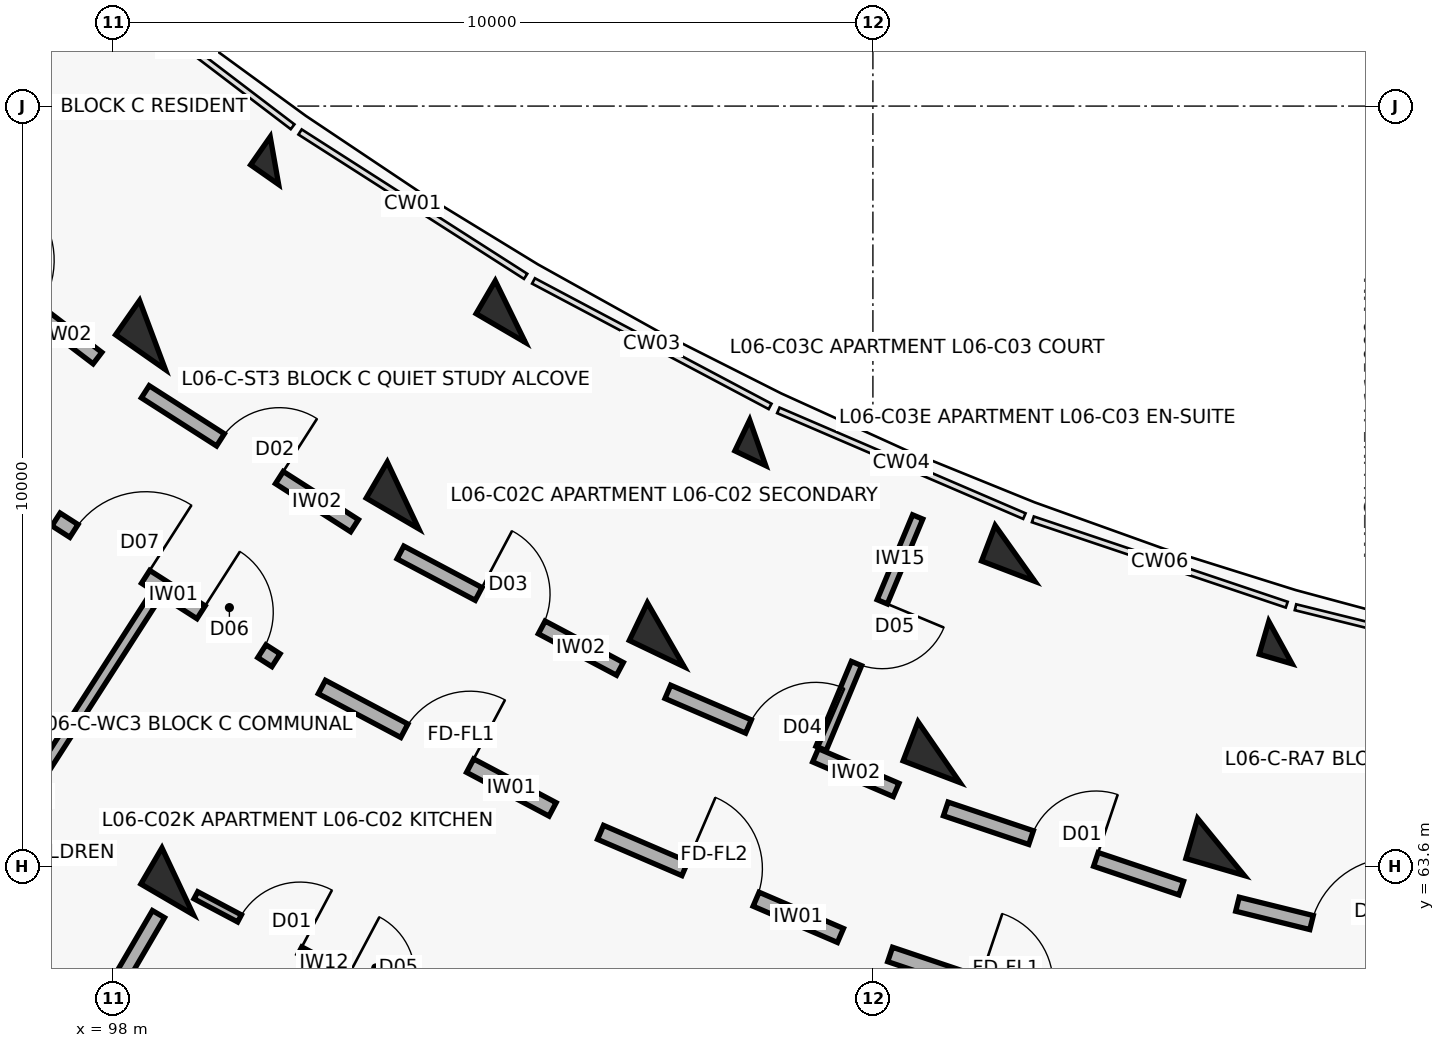
"""IFC4 building model, lengths in metres.
Left out: names, types, materials, properties, quantities, classifications, styles, units other than length and angle.
Written with IfcOpenShell. Run it as: python <this file> out.ifc"""

import sys

from ifc_helpers import new_model, si_unit, direction, frame, frame_2d, origin, origin_2d, place, context, subcontext, project, spatial, rectangle, extrude, element, fill, save


model = new_model("IFC4")
c1 = context("Model", 3, precision=1e-05, world=origin(), true_north=direction((0.0, 1.0)))
c2 = subcontext(c1, "Body", "Model", "MODEL_VIEW")
j1 = project(units=[si_unit("LENGTHUNIT", "METRE"), si_unit("PLANEANGLEUNIT", "RADIAN")], contexts=[c1])
p1 = place(None, origin())
s1 = spatial("IfcSite", under=j1, at=p1, CompositionType="ELEMENT")
p2 = place(p1, origin())
s2 = spatial("IfcBuilding", under=s1, at=p2, CompositionType="ELEMENT")
p3 = place(p2, frame((0.0, 0.0, 20.5)))
s3 = spatial("IfcBuildingStorey", under=s2, at=p3, CompositionType="ELEMENT", Elevation=20.5)
p4 = place(p3, frame((100.126, 72.882, 0.0), z_axis=(0.0, 0.0, 1.0), x_axis=(-0.573004420611, -0.819552276527, 0.0)))
e1 = element("IfcColumn", 1, at=p4, inside=s3, PredefinedType="COLUMN", context=c2, shape_type="SweptSolid", body=[
    extrude(rectangle(XDim=0.45, YDim=0.45, at=origin_2d()), origin(), (0.0, 0.0, 1.0), 3.1),
])
p5 = place(p3, frame((98.522, 70.587, 0.0), z_axis=(0.0, 0.0, 1.0), x_axis=(-0.573004420611, -0.819552276527, 0.0)))
e2 = element("IfcColumn", 2, at=p5, inside=s3, PredefinedType="COLUMN", context=c2, shape_type="SweptSolid", body=[
    extrude(rectangle(XDim=0.55, YDim=0.8, at=origin_2d()), origin(), (0.0, 0.0, 1.0), 3.1),
])
p6 = place(p3, frame((103.229, 70.896, 0.0), z_axis=(0.0, 0.0, 1.0), x_axis=(-0.504226211181, -0.863571611366, 0.0)))
e3 = element("IfcColumn", 3, at=p6, inside=s3, PredefinedType="COLUMN", context=c2, shape_type="SweptSolid", body=[
    extrude(rectangle(XDim=0.5, YDim=0.75, at=origin_2d()), origin(), (0.0, 0.0, 1.0), 3.1),
])
for number, where, z_axis, x_axis in (
    (4, (101.817, 68.478, 0.0), (0.0, 0.0, 1.0), (-0.504, -0.864, 0.0)),
    (5, (98.853, 63.4, 0.0), (0.0, 0.0, 1.0), (-0.504, -0.864, 0.0)),
):
    element("IfcColumn", number, at=place(p3, frame(where, z_axis=z_axis, x_axis=x_axis)), inside=s3, PredefinedType="COLUMN", context=c2, shape_type="SweptSolid", body=[
        extrude(rectangle(XDim=0.55, YDim=0.8, at=origin_2d()), origin(), (0.0, 0.0, 1.0), 3.1),
    ])
p7 = place(p3, frame((106.484, 69.169, 0.0), z_axis=(0.0, 0.0, 1.0), x_axis=(-0.432085748802, -0.901832526405, 0.0)))
e6 = element("IfcColumn", 6, at=p7, inside=s3, PredefinedType="COLUMN", context=c2, shape_type="SweptSolid", body=[
    extrude(rectangle(XDim=0.45, YDim=0.45, at=origin_2d()), origin(), (0.0, 0.0, 1.0), 3.1),
])
p8 = place(p3, frame((105.274, 66.644, 0.0), z_axis=(0.0, 0.0, 1.0), x_axis=(-0.432085748802, -0.901832526405, 0.0)))
e7 = element("IfcColumn", 7, at=p8, inside=s3, PredefinedType="COLUMN", context=c2, shape_type="SweptSolid", body=[
    extrude(rectangle(XDim=0.55, YDim=0.8, at=origin_2d()), origin(), (0.0, 0.0, 1.0), 3.1),
])
p9 = place(p3, frame((109.869, 67.714, 0.0), z_axis=(0.0, 0.0, 1.0), x_axis=(-0.357064076459, -0.934079892355, 0.0)))
e8 = element("IfcColumn", 8, at=p9, inside=s3, PredefinedType="COLUMN", context=c2, shape_type="SweptSolid", body=[
    extrude(rectangle(XDim=0.5, YDim=0.75, at=origin_2d()), origin(), (0.0, 0.0, 1.0), 3.1),
])
p10 = place(p3, frame((108.869, 65.099, 0.0), z_axis=(0.0, 0.0, 1.0), x_axis=(-0.357064076459, -0.934079892355, 0.0)))
e9 = element("IfcColumn", 9, at=p10, inside=s3, PredefinedType="COLUMN", context=c2, shape_type="SweptSolid", body=[
    extrude(rectangle(XDim=0.55, YDim=0.8, at=origin_2d()), origin(), (0.0, 0.0, 1.0), 3.1),
])
p11 = place(p3, frame((113.362, 66.54, 0.0), z_axis=(0.0, 0.0, 1.0), x_axis=(-0.27966144946, -0.96009867914, 0.0)))
e10 = element("IfcColumn", 10, at=p11, inside=s3, PredefinedType="COLUMN", context=c2, shape_type="SweptSolid", body=[
    extrude(rectangle(XDim=0.45, YDim=0.45, at=origin_2d()), origin(), (0.0, 0.0, 1.0), 3.1),
])
p12 = place(p3, frame((112.579, 63.852, 0.0), z_axis=(0.0, 0.0, 1.0), x_axis=(-0.27966144946, -0.96009867914, 0.0)))
e11 = element("IfcColumn", 11, at=p12, inside=s3, PredefinedType="COLUMN", context=c2, shape_type="SweptSolid", body=[
    extrude(rectangle(XDim=0.55, YDim=0.8, at=origin_2d()), origin(), (0.0, 0.0, 1.0), 3.1),
])
p13 = place(p3, frame((95.309, 72.18, 0.0), z_axis=(0.0, 0.0, 1.0), x_axis=(0.795463961918, -0.606000895453, 0.0)))
e12 = element("IfcWall", 12, at=p13, inside=s3, PredefinedType="SOLIDWALL", context=c2, shape_type="SweptSolid", body=[
    extrude(rectangle(XDim=3.129, YDim=0.19, at=frame_2d((1.564, 0.0))), origin(), (0.0, 0.0, 1.0), 2.08),
])
p14 = place(p13, frame((1.004, 0.0, 0.0)))
e13 = element("IfcOpeningElement", 13, at=p14, cuts=e12, PredefinedType="OPENING", context=c2, shape_type="SweptSolid", body=[
    extrude(rectangle(XDim=1.12, YDim=2.15, at=frame_2d((0.56, 1.075))), frame((0.0, 0.105, 0.0), z_axis=(0.0, -1.0, 0.0), x_axis=(1.0, 0.0, 0.0)), (0.0, 0.0, 1.0), 0.21),
])
p15 = place(p3, frame((97.252, 68.161, 0.0), z_axis=(0.0, 0.0, 1.0), x_axis=(0.842289466461, -0.53902546757, 0.0)))
e14 = element("IfcWall", 14, at=p15, inside=s3, PredefinedType="SOLIDWALL", context=c2, shape_type="SweptSolid", body=[
    extrude(rectangle(XDim=3.436, YDim=0.2, at=frame_2d((1.718, 0.0))), origin(), (0.0, 0.0, 1.0), 2.08),
])
p16 = place(p15, frame((0.28, 0.0, 0.0)))
e15 = element("IfcOpeningElement", 15, at=p16, cuts=e14, PredefinedType="OPENING", context=c2, shape_type="SweptSolid", body=[
    extrude(rectangle(XDim=1.12, YDim=2.15, at=frame_2d((0.56, 1.075))), frame((0.0, 0.11, 0.0), z_axis=(0.0, -1.0, 0.0), x_axis=(1.0, 0.0, 0.0)), (0.0, 0.0, 1.0), 0.22),
])
p17 = place(p15, frame((2.266, 0.0, 0.0)))
e16 = element("IfcOpeningElement", 16, at=p17, cuts=e14, PredefinedType="OPENING", context=c2, shape_type="SweptSolid", body=[
    extrude(rectangle(XDim=0.95, YDim=2.1, at=frame_2d((0.475, 1.05))), frame((0.0, 0.11, 0.0), z_axis=(0.0, -1.0, 0.0), x_axis=(1.0, 0.0, 0.0)), (0.0, 0.0, 1.0), 0.22),
])
p18 = place(p3, frame((98.427, 69.841, 0.0), z_axis=(0.0, 0.0, 1.0), x_axis=(0.842280895761, -0.539038860043, 0.0)))
e17 = element("IfcWall", 17, at=p18, inside=s3, PredefinedType="SOLIDWALL", context=c2, shape_type="SweptSolid", body=[
    extrude(rectangle(XDim=3.269, YDim=0.19, at=frame_2d((1.634, 0.0))), origin(), (0.0, 0.0, 1.0), 2.08),
])
p19 = place(p18, frame((1.174, 0.0, 0.0)))
e18 = element("IfcOpeningElement", 18, at=p19, cuts=e17, PredefinedType="OPENING", context=c2, shape_type="SweptSolid", body=[
    extrude(rectangle(XDim=0.92, YDim=2.1, at=frame_2d((0.46, 1.05))), frame((0.0, 0.105, 0.0), z_axis=(0.0, -1.0, 0.0), x_axis=(1.0, 0.0, 0.0)), (0.0, 0.0, 1.0), 0.21),
])
p20 = place(p3, frame((98.504, 67.072, 0.0), z_axis=(0.0, 0.0, 1.0), x_axis=(-0.540338452216, -0.841447774408, 0.0)))
e19 = element("IfcWall", 19, at=p20, inside=s3, PredefinedType="PARTITIONING", context=c2, shape_type="SweptSolid", body=[
    extrude(rectangle(XDim=7.95, YDim=0.14, at=frame_2d((3.975, 0.0))), origin(), (0.0, 0.0, 1.0), 2.08),
])
p21 = place(p20, frame((6.05, 0.0, 0.0)))
e20 = element("IfcOpeningElement", 20, at=p21, cuts=e19, PredefinedType="OPENING", context=c2, shape_type="SweptSolid", body=[
    extrude(rectangle(XDim=0.92, YDim=2.1, at=frame_2d((0.46, 1.05))), frame((0.0, 0.08, 0.0), z_axis=(0.0, -1.0, 0.0), x_axis=(1.0, 0.0, 0.0)), (0.0, 0.0, 1.0), 0.16),
])
p22 = place(p3, frame((100.75, 65.956, 0.0), z_axis=(0.0, 0.0, 1.0), x_axis=(0.883440266101, -0.468543803963, 0.0)))
e21 = element("IfcWall", 21, at=p22, inside=s3, PredefinedType="SOLIDWALL", context=c2, shape_type="SweptSolid", body=[
    extrude(rectangle(XDim=3.436, YDim=0.2, at=frame_2d((1.718, 0.0))), origin(), (0.0, 0.0, 1.0), 2.08),
])
p23 = place(p22, frame((1.228, 0.0, 0.0)))
e22 = element("IfcOpeningElement", 22, at=p23, cuts=e21, PredefinedType="OPENING", context=c2, shape_type="SweptSolid", body=[
    extrude(rectangle(XDim=0.98, YDim=2.15, at=frame_2d((0.49, 1.075))), frame((0.0, 0.11, 0.0), z_axis=(0.0, -1.0, 0.0), x_axis=(1.0, 0.0, 0.0)), (0.0, 0.0, 1.0), 0.22),
])
p24 = place(p3, frame((101.784, 67.726, 0.0), z_axis=(0.0, 0.0, 1.0), x_axis=(0.883444301944, -0.468536194293, 0.0)))
e23 = element("IfcWall", 23, at=p24, inside=s3, PredefinedType="SOLIDWALL", context=c2, shape_type="SweptSolid", body=[
    extrude(rectangle(XDim=3.269, YDim=0.19, at=frame_2d((1.634, 0.0))), origin(), (0.0, 0.0, 1.0), 2.08),
])
p25 = place(p24, frame((1.164, 0.0, 0.0)))
e24 = element("IfcOpeningElement", 24, at=p25, cuts=e23, PredefinedType="OPENING", context=c2, shape_type="SweptSolid", body=[
    extrude(rectangle(XDim=0.94, YDim=2.1, at=frame_2d((0.47, 1.05))), frame((0.0, 0.105, 0.0), z_axis=(0.0, -1.0, 0.0), x_axis=(1.0, 0.0, 0.0)), (0.0, 0.0, 1.0), 0.21),
])
p26 = place(p3, frame((99.093, 63.216, 0.0), z_axis=(0.0, 0.0, 1.0), x_axis=(0.883432667361, -0.468558131121, 0.0)))
e25 = element("IfcWall", 25, at=p26, inside=s3, PredefinedType="PARTITIONING", context=c2, shape_type="SweptSolid", body=[
    extrude(rectangle(XDim=3.797, YDim=0.105, at=frame_2d((1.899, 0.0))), origin(), (0.0, 0.0, 1.0), 2.08),
])
p27 = place(p26, frame((0.65, 0.0, 0.0)))
e26 = element("IfcOpeningElement", 26, at=p27, cuts=e25, PredefinedType="OPENING", context=c2, shape_type="SweptSolid", body=[
    extrude(rectangle(XDim=0.9, YDim=2.1, at=frame_2d((0.45, 1.05))), frame((0.0, 0.062, 0.0), z_axis=(0.0, -1.0, 0.0), x_axis=(1.0, 0.0, 0.0)), (0.0, 0.0, 1.0), 0.125),
])
p28 = place(p26, frame((2.267, 0.0, 0.0)))
e27 = element("IfcOpeningElement", 27, at=p28, cuts=e25, PredefinedType="OPENING", context=c2, shape_type="SweptSolid", body=[
    extrude(rectangle(XDim=0.88, YDim=2.1, at=frame_2d((0.44, 1.05))), frame((0.0, 0.062, 0.0), z_axis=(0.0, -1.0, 0.0), x_axis=(1.0, 0.0, 0.0)), (0.0, 0.0, 1.0), 0.125),
])
p29 = place(p3, frame((98.601, 62.968, 0.0), z_axis=(0.0, 0.0, 1.0), x_axis=(-0.504216452091, -0.863577309475, 0.0)))
e28 = element("IfcWall", 28, at=p29, inside=s3, PredefinedType="SOLIDWALL", context=c2, shape_type="SweptSolid", body=[
    extrude(rectangle(XDim=4.35, YDim=0.185, at=frame_2d((2.175, 0.0))), origin(), (0.0, 0.0, 1.0), 2.08),
])
p30 = place(p3, frame((104.417, 64.044, 0.0), z_axis=(0.0, 0.0, 1.0), x_axis=(0.918718172399, -0.394913813008, 0.0)))
e29 = element("IfcWall", 29, at=p30, inside=s3, PredefinedType="SOLIDWALL", context=c2, shape_type="SweptSolid", body=[
    extrude(rectangle(XDim=3.436, YDim=0.2, at=frame_2d((1.718, 0.0))), origin(), (0.0, 0.0, 1.0), 2.08),
])
p31 = place(p30, frame((1.208, 0.0, 0.0)))
e30 = element("IfcOpeningElement", 30, at=p31, cuts=e29, PredefinedType="OPENING", context=c2, shape_type="SweptSolid", body=[
    extrude(rectangle(XDim=1.02, YDim=2.15, at=frame_2d((0.51, 1.075))), frame((0.0, 0.11, 0.0), z_axis=(0.0, -1.0, 0.0), x_axis=(1.0, 0.0, 0.0)), (0.0, 0.0, 1.0), 0.22),
])
p32 = place(p3, frame((105.302, 65.893, 0.0), z_axis=(0.0, 0.0, 1.0), x_axis=(0.918723391052, -0.394901672235, 0.0)))
e31 = element("IfcWall", 31, at=p32, inside=s3, PredefinedType="SOLIDWALL", context=c2, shape_type="SweptSolid", body=[
    extrude(rectangle(XDim=3.269, YDim=0.19, at=frame_2d((1.634, 0.0))), origin(), (0.0, 0.0, 1.0), 2.08),
])
p33 = place(p32, frame((1.154, 0.0, 0.0)))
e32 = element("IfcOpeningElement", 32, at=p33, cuts=e31, PredefinedType="OPENING", context=c2, shape_type="SweptSolid", body=[
    extrude(rectangle(XDim=0.96, YDim=2.1, at=frame_2d((0.48, 1.05))), frame((0.0, 0.105, 0.0), z_axis=(0.0, -1.0, 0.0), x_axis=(1.0, 0.0, 0.0)), (0.0, 0.0, 1.0), 0.21),
])
p34 = place(p3, frame((108.589, 68.194, 0.0), z_axis=(0.0, 0.0, 1.0), x_axis=(-0.385151143297, -0.922853507777, 0.0)))
e33 = element("IfcWall", 33, at=p34, inside=s3, PredefinedType="PARTITIONING", context=c2, shape_type="SweptSolid", body=[
    extrude(rectangle(XDim=3.3, YDim=0.145, at=frame_2d((1.65, 0.0))), origin(), (0.0, 0.0, 1.0), 2.08),
])
p35 = place(p34, frame((1.21, 0.0, 0.0)))
e34 = element("IfcOpeningElement", 34, at=p35, cuts=e33, PredefinedType="OPENING", context=c2, shape_type="SweptSolid", body=[
    extrude(rectangle(XDim=0.88, YDim=2.1, at=frame_2d((0.44, 1.05))), frame((0.0, 0.083, 0.0), z_axis=(0.0, -1.0, 0.0), x_axis=(1.0, 0.0, 0.0)), (0.0, 0.0, 1.0), 0.165),
])
p36 = place(p3, frame((108.227, 62.437, 0.0), z_axis=(0.0, 0.0, 1.0), x_axis=(0.947884468821, -0.318614239745, 0.0)))
e35 = element("IfcWall", 35, at=p36, inside=s3, PredefinedType="SOLIDWALL", context=c2, shape_type="SweptSolid", body=[
    extrude(rectangle(XDim=3.436, YDim=0.2, at=frame_2d((1.718, 0.0))), origin(), (0.0, 0.0, 1.0), 2.08),
])
p37 = place(p36, frame((1.228, 0.0, 0.0)))
e36 = element("IfcOpeningElement", 36, at=p37, cuts=e35, PredefinedType="OPENING", context=c2, shape_type="SweptSolid", body=[
    extrude(rectangle(XDim=0.98, YDim=2.15, at=frame_2d((0.49, 1.075))), frame((0.0, 0.11, 0.0), z_axis=(0.0, -1.0, 0.0), x_axis=(1.0, 0.0, 0.0)), (0.0, 0.0, 1.0), 0.22),
])
p38 = place(p3, frame((108.958, 64.352, 0.0), z_axis=(0.0, 0.0, 1.0), x_axis=(0.94787351033, -0.318646839643, 0.0)))
e37 = element("IfcWall", 37, at=p38, inside=s3, PredefinedType="SOLIDWALL", context=c2, shape_type="SweptSolid", body=[
    extrude(rectangle(XDim=3.269, YDim=0.19, at=frame_2d((1.634, 0.0))), origin(), (0.0, 0.0, 1.0), 2.08),
])
p39 = place(p38, frame((1.184, 0.0, 0.0)))
e38 = element("IfcOpeningElement", 38, at=p39, cuts=e37, PredefinedType="OPENING", context=c2, shape_type="SweptSolid", body=[
    extrude(rectangle(XDim=0.9, YDim=2.1, at=frame_2d((0.45, 1.05))), frame((0.0, 0.105, 0.0), z_axis=(0.0, -1.0, 0.0), x_axis=(1.0, 0.0, 0.0)), (0.0, 0.0, 1.0), 0.21),
])
p40 = place(p3, frame((112.796, 63.098, 0.0), z_axis=(0.0, 0.0, 1.0), x_axis=(0.970708998014, -0.240258280136, 0.0)))
e39 = element("IfcWall", 39, at=p40, inside=s3, PredefinedType="SOLIDWALL", context=c2, shape_type="SweptSolid", body=[
    extrude(rectangle(XDim=3.129, YDim=0.19, at=frame_2d((1.564, 0.0))), origin(), (0.0, 0.0, 1.0), 2.08),
])
p41 = place(p40, frame((1.004, 0.0, 0.0)))
e40 = element("IfcOpeningElement", 40, at=p41, cuts=e39, PredefinedType="OPENING", context=c2, shape_type="SweptSolid", body=[
    extrude(rectangle(XDim=1.12, YDim=2.15, at=frame_2d((0.56, 1.075))), frame((0.0, 0.105, 0.0), z_axis=(0.0, -1.0, 0.0), x_axis=(1.0, 0.0, 0.0)), (0.0, 0.0, 1.0), 0.21),
])
p42 = place(p16, origin())
e41 = element("IfcDoor", 41, at=p42, inside=s3, OperationType="SINGLE_SWING_RIGHT", PredefinedType="DOOR", context=c2, shape_type="SweptSolid", body=[
    extrude(rectangle(XDim=1.12, YDim=2.15, at=frame_2d((0.56, 1.075))), frame((0.0, 0.025, 0.0), z_axis=(0.0, -1.0, 0.0), x_axis=(1.0, 0.0, 0.0)), (0.0, 0.0, 1.0), 0.05),
])
fill(e15, e41)
p43 = place(p17, origin())
e42 = element("IfcDoor", 42, at=p43, inside=s3, OperationType="SINGLE_SWING_LEFT", PredefinedType="DOOR", context=c2, shape_type="SweptSolid", body=[
    extrude(rectangle(XDim=0.95, YDim=2.1, at=frame_2d((0.475, 1.05))), frame((0.0, 0.025, 0.0), z_axis=(0.0, -1.0, 0.0), x_axis=(1.0, 0.0, 0.0)), (0.0, 0.0, 1.0), 0.05),
])
fill(e16, e42)
p44 = place(p19, origin())
e43 = element("IfcDoor", 43, at=p44, inside=s3, OperationType="SINGLE_SWING_RIGHT", PredefinedType="DOOR", context=c2, shape_type="SweptSolid", body=[
    extrude(rectangle(XDim=0.92, YDim=2.1, at=frame_2d((0.46, 1.05))), frame((0.0, 0.025, 0.0), z_axis=(0.0, -1.0, 0.0), x_axis=(1.0, 0.0, 0.0)), (0.0, 0.0, 1.0), 0.05),
])
fill(e18, e43)
p45 = place(p23, origin())
e44 = element("IfcDoor", 44, at=p45, inside=s3, OperationType="SINGLE_SWING_RIGHT", PredefinedType="DOOR", context=c2, shape_type="SweptSolid", body=[
    extrude(rectangle(XDim=0.98, YDim=2.15, at=frame_2d((0.49, 1.075))), frame((0.0, 0.025, 0.0), z_axis=(0.0, -1.0, 0.0), x_axis=(1.0, 0.0, 0.0)), (0.0, 0.0, 1.0), 0.05),
])
fill(e22, e44)
p46 = place(p25, origin())
e45 = element("IfcDoor", 45, at=p46, inside=s3, OperationType="SINGLE_SWING_LEFT", PredefinedType="DOOR", context=c2, shape_type="SweptSolid", body=[
    extrude(rectangle(XDim=0.94, YDim=2.1, at=frame_2d((0.47, 1.05))), frame((0.0, 0.025, 0.0), z_axis=(0.0, -1.0, 0.0), x_axis=(1.0, 0.0, 0.0)), (0.0, 0.0, 1.0), 0.05),
])
fill(e24, e45)
p47 = place(p27, origin())
e46 = element("IfcDoor", 46, at=p47, inside=s3, OperationType="SINGLE_SWING_RIGHT", PredefinedType="DOOR", context=c2, shape_type="SweptSolid", body=[
    extrude(rectangle(XDim=0.9, YDim=2.1, at=frame_2d((0.45, 1.05))), frame((0.0, 0.025, 0.0), z_axis=(0.0, -1.0, 0.0), x_axis=(1.0, 0.0, 0.0)), (0.0, 0.0, 1.0), 0.05),
])
fill(e26, e46)
p48 = place(p31, origin())
e47 = element("IfcDoor", 47, at=p48, inside=s3, OperationType="SINGLE_SWING_LEFT", PredefinedType="DOOR", context=c2, shape_type="SweptSolid", body=[
    extrude(rectangle(XDim=1.02, YDim=2.15, at=frame_2d((0.51, 1.075))), frame((0.0, 0.025, 0.0), z_axis=(0.0, -1.0, 0.0), x_axis=(1.0, 0.0, 0.0)), (0.0, 0.0, 1.0), 0.05),
])
fill(e30, e47)
p49 = place(p33, origin())
e48 = element("IfcDoor", 48, at=p49, inside=s3, OperationType="SINGLE_SWING_RIGHT", PredefinedType="DOOR", context=c2, shape_type="SweptSolid", body=[
    extrude(rectangle(XDim=0.96, YDim=2.1, at=frame_2d((0.48, 1.05))), frame((0.0, 0.025, 0.0), z_axis=(0.0, -1.0, 0.0), x_axis=(1.0, 0.0, 0.0)), (0.0, 0.0, 1.0), 0.05),
])
fill(e32, e48)
p50 = place(p35, origin())
e49 = element("IfcDoor", 49, at=p50, inside=s3, OperationType="SINGLE_SWING_LEFT", PredefinedType="DOOR", context=c2, shape_type="SweptSolid", body=[
    extrude(rectangle(XDim=0.88, YDim=2.1, at=frame_2d((0.44, 1.05))), frame((0.0, 0.025, 0.0), z_axis=(0.0, -1.0, 0.0), x_axis=(1.0, 0.0, 0.0)), (0.0, 0.0, 1.0), 0.05),
])
fill(e34, e49)
p51 = place(p39, origin())
e50 = element("IfcDoor", 50, at=p51, inside=s3, OperationType="SINGLE_SWING_RIGHT", PredefinedType="DOOR", context=c2, shape_type="SweptSolid", body=[
    extrude(rectangle(XDim=0.9, YDim=2.1, at=frame_2d((0.45, 1.05))), frame((0.0, 0.025, 0.0), z_axis=(0.0, -1.0, 0.0), x_axis=(1.0, 0.0, 0.0)), (0.0, 0.0, 1.0), 0.05),
])
fill(e38, e50)
p52 = place(p41, origin())
e51 = element("IfcDoor", 51, at=p52, inside=s3, OperationType="SINGLE_SWING_RIGHT", PredefinedType="DOOR", context=c2, shape_type="SweptSolid", body=[
    extrude(rectangle(XDim=1.12, YDim=2.15, at=frame_2d((0.56, 1.075))), frame((0.0, 0.025, 0.0), z_axis=(0.0, -1.0, 0.0), x_axis=(1.0, 0.0, 0.0)), (0.0, 0.0, 1.0), 0.05),
])
fill(e40, e51)
save(model, sys.argv[1])
